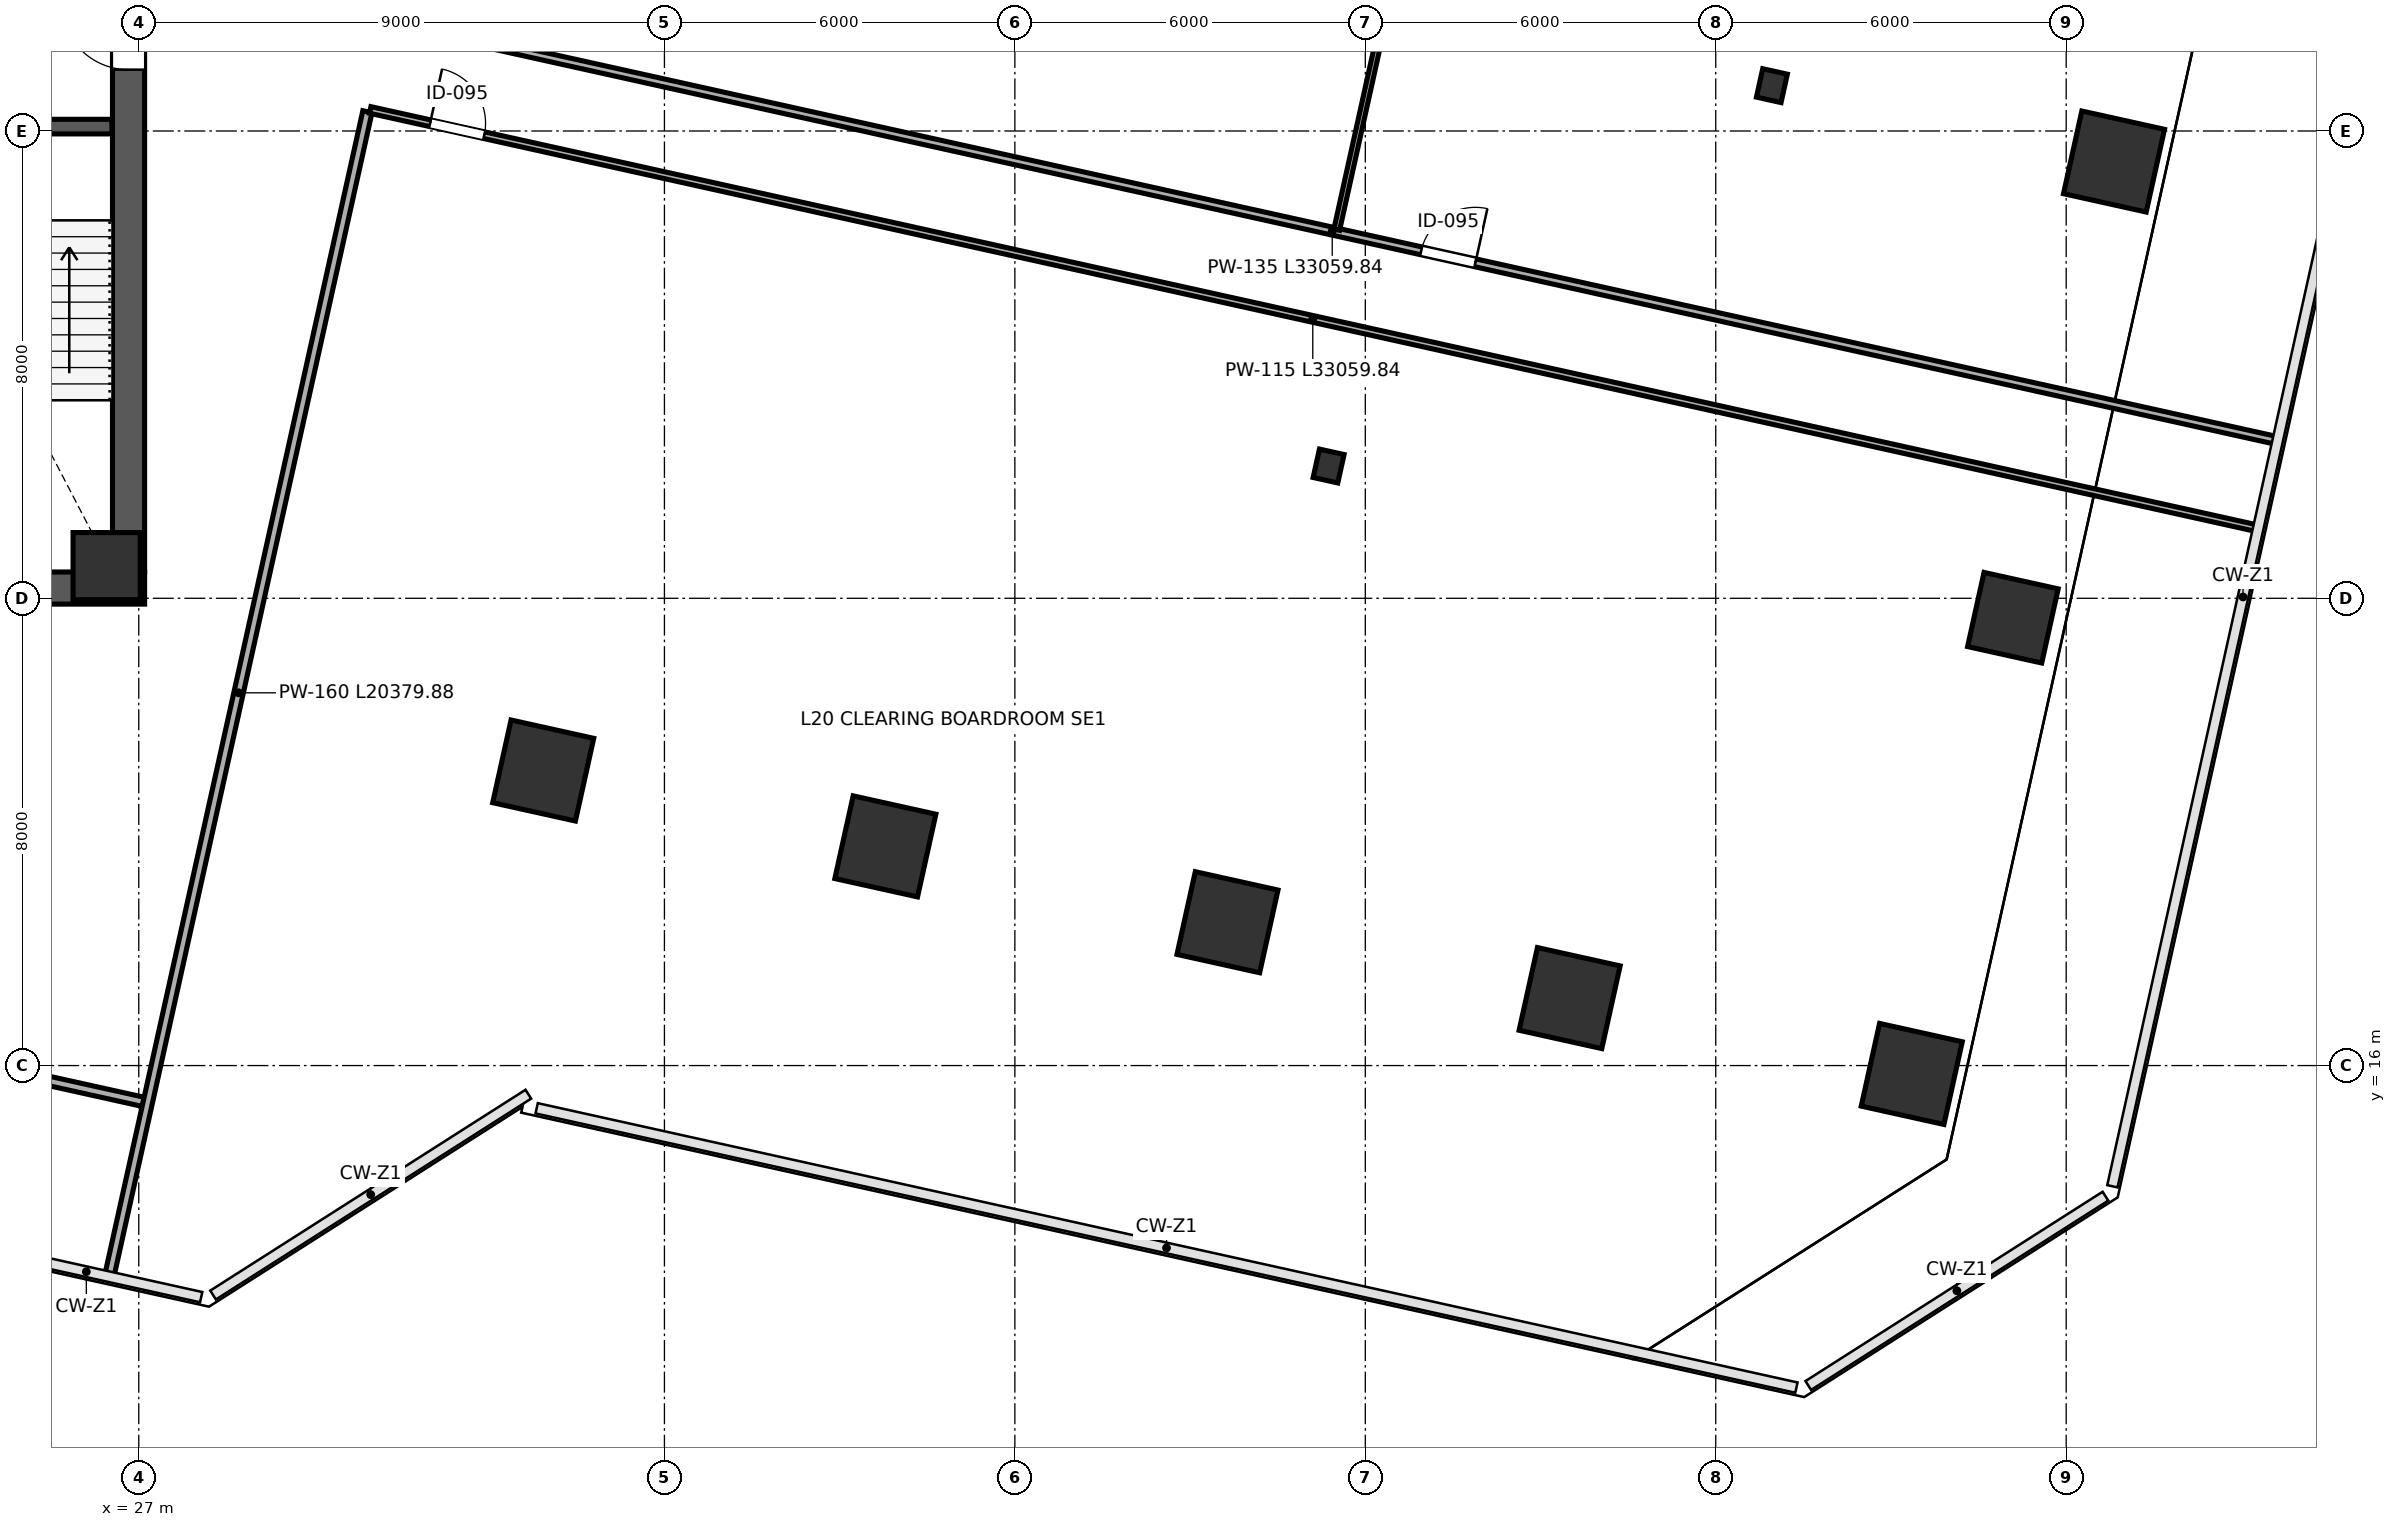
"""IFC4 building model, lengths in metres.
Left out: names, types, materials, properties, quantities, classifications, styles, units other than length and angle.
Written with IfcOpenShell. Run it as: python <this file> out.ifc"""

import sys

from ifc_helpers import new_model, si_unit, direction, frame, frame_2d, origin, origin_2d, place, context, subcontext, project, spatial, rectangle, i_section, extrude, clip, halfspace, source, transform, mapped, element, fill, save


model = new_model("IFC4")
c1 = context("Model", 3, precision=1e-05, world=origin(), true_north=direction((0.0, 1.0)))
c2 = subcontext(c1, "Body", "Model", "MODEL_VIEW")
j1 = project(units=[si_unit("LENGTHUNIT", "METRE"), si_unit("PLANEANGLEUNIT", "RADIAN")], contexts=[c1])
p1 = place(None, origin())
s1 = spatial("IfcSite", under=j1, at=p1, CompositionType="ELEMENT")
p2 = place(p1, origin())
s2 = spatial("IfcBuilding", under=s1, at=p2, CompositionType="ELEMENT")
p3 = place(p2, frame((0.0, 0.0, 91.6)))
s3 = spatial("IfcBuildingStorey", under=s2, at=p3, CompositionType="ELEMENT", Elevation=91.6)
m1 = source(origin(), c2, "Body", "SweptSolid", [
    extrude(rectangle(XDim=1.15, YDim=1.15, at=origin_2d()), origin(), (0.0, 0.0, 1.0), 4.198),
])
p4 = place(p3, frame((26.45, 24.55, 0.001), z_axis=(0.0, 0.0, 1.0), x_axis=(1.0, 0.0, 0.0)))
e1 = element("IfcColumn", 1, at=p4, inside=s3, PredefinedType="COLUMN", context=c2, shape_type="MappedRepresentation", body=[
    mapped(m1, transform((0.0, 0.0, 0.0), scale=1.0)),
])
p5 = place(p3, frame((33.925, 21.051, 0.0), z_axis=(-0.057336337044, -0.06370704116, 0.996320208247), x_axis=(-0.581417437617, 0.813393895809, 0.018550835444)))
e2 = element("IfcColumn", 2, at=p5, inside=s3, PredefinedType="COLUMN", context=c2, shape_type="Clipping", body=[
    clip(clip(extrude(rectangle(XDim=1.45, YDim=1.45, at=origin_2d()), origin(), (0.0, 0.0, 1.0), 4.216), halfspace(frame((0.0, 0.0, 0.075), z_axis=(0.0, 0.0, -1.0), x_axis=(1.0, 0.0, 0.0)), False)), halfspace(frame((0.0, 0.0, 4.14), z_axis=(0.0, 0.0, 1.0), x_axis=(1.0, 0.0, 0.0)), False)),
])
p6 = place(p3, frame((39.783, 19.753, 0.0), z_axis=(-0.064279136537, -0.093675435276, 0.993525593748), x_axis=(-0.68333326756, 0.729692406215, 0.02458938302)))
e3 = element("IfcColumn", 3, at=p6, inside=s3, PredefinedType="COLUMN", context=c2, shape_type="Clipping", body=[
    clip(clip(extrude(rectangle(XDim=1.45, YDim=1.45, at=origin_2d()), origin(), (0.0, 0.0, 1.0), 4.227), halfspace(frame((0.0, 0.0, 0.1), z_axis=(0.0, 0.0, -1.0), x_axis=(1.0, 0.0, 0.0)), False)), halfspace(frame((0.0, 0.0, 4.128), z_axis=(0.0, 0.0, 1.0), x_axis=(1.0, 0.0, 0.0)), False)),
])
p7 = place(p3, frame((45.64, 18.454, 0.0), z_axis=(-0.071001350426, -0.123360531049, 0.989818664007), x_axis=(-0.739283898003, 0.672688830219, 0.030806750093)))
e4 = element("IfcColumn", 4, at=p7, inside=s3, PredefinedType="COLUMN", context=c2, shape_type="Clipping", body=[
    clip(clip(extrude(rectangle(XDim=1.45, YDim=1.45, at=origin_2d()), origin(), (0.0, 0.0, 1.0), 4.243), halfspace(frame((0.0, 0.0, 0.125), z_axis=(0.0, 0.0, -1.0), x_axis=(1.0, 0.0, 0.0)), False)), halfspace(frame((0.0, 0.0, 4.118), z_axis=(0.0, 0.0, 1.0), x_axis=(1.0, 0.0, 0.0)), False)),
])
p8 = place(p3, frame((47.372, 26.264, 0.0), z_axis=(-0.030981497177, -0.132794298308, 0.990659286117), x_axis=(-0.902046991682, 0.430627634873, 0.029513808318)))
e5 = element("IfcColumn", 5, at=p8, inside=s3, PredefinedType="COLUMN", context=c2, shape_type="Clipping", body=[
    clip(clip(extrude(i_section(OverallWidth=0.432, OverallDepth=0.498, WebThickness=0.056, FlangeThickness=0.089, FilletRadius=0.015, at=origin_2d()), origin(), (0.0, 0.0, 1.0), 4.24), halfspace(frame((0.0, 0.0, 0.041), z_axis=(0.0, 0.0, -1.0), x_axis=(1.0, 0.0, 0.0)), False)), halfspace(frame((0.0, 0.0, 4.199), z_axis=(0.0, 0.0, 1.0), x_axis=(1.0, 0.0, 0.0)), False)),
])
p9 = place(p3, frame((49.104, 34.075, 0.0), z_axis=(0.009090987386, -0.142003524493, 0.989824405124), x_axis=(-0.987988794605, 0.15142528952, 0.030798107544)))
e6 = element("IfcColumn", 6, at=p9, inside=s3, PredefinedType="COLUMN", context=c2, shape_type="Clipping", body=[
    clip(clip(extrude(i_section(OverallWidth=0.432, OverallDepth=0.498, WebThickness=0.056, FlangeThickness=0.089, FilletRadius=0.015, at=origin_2d()), origin(), (0.0, 0.0, 1.0), 4.243), halfspace(frame((0.0, 0.0, 0.042), z_axis=(0.0, 0.0, -1.0), x_axis=(1.0, 0.0, 0.0)), False)), halfspace(frame((0.0, 0.0, 4.201), z_axis=(0.0, 0.0, 1.0), x_axis=(1.0, 0.0, 0.0)), False)),
])
p10 = place(p3, frame((51.498, 17.155, 0.0), z_axis=(-0.077658402909, -0.15268237622, 0.985219399144), x_axis=(-0.773528500234, 0.632676114937, 0.037075502884)))
e7 = element("IfcColumn", 7, at=p10, inside=s3, PredefinedType="COLUMN", context=c2, shape_type="Clipping", body=[
    clip(clip(extrude(rectangle(XDim=1.45, YDim=1.45, at=origin_2d()), origin(), (0.0, 0.0, 1.0), 4.263), halfspace(frame((0.0, 0.0, 0.151), z_axis=(0.0, 0.0, -1.0), x_axis=(1.0, 0.0, 0.0)), False)), halfspace(frame((0.0, 0.0, 4.112), z_axis=(0.0, 0.0, 1.0), x_axis=(1.0, 0.0, 0.0)), False)),
])
p11 = place(p3, frame((54.961, 32.776, 0.0), z_axis=(0.002118993695, -0.17129486873, 0.98521752817), x_axis=(-0.978858988492, 0.201147495706, 0.037077831903)))
e8 = element("IfcColumn", 8, at=p11, inside=s3, PredefinedType="COLUMN", context=c2, shape_type="Clipping", body=[
    clip(clip(extrude(i_section(OverallWidth=0.432, OverallDepth=0.498, WebThickness=0.056, FlangeThickness=0.089, FilletRadius=0.015, at=origin_2d()), origin(), (0.0, 0.0, 1.0), 4.263), halfspace(frame((0.0, 0.0, 0.051), z_axis=(0.0, 0.0, -1.0), x_axis=(1.0, 0.0, 0.0)), False)), halfspace(frame((0.0, 0.0, 4.212), z_axis=(0.0, 0.0, 1.0), x_axis=(1.0, 0.0, 0.0)), False)),
])
p12 = place(p3, frame((57.356, 15.857, 0.0), z_axis=(-0.084177104855, -0.181567395317, 0.979769103399), x_axis=(-0.796541675697, 0.603029895618, 0.043316323348)))
e9 = element("IfcColumn", 9, at=p12, inside=s3, PredefinedType="COLUMN", context=c2, shape_type="Clipping", body=[
    clip(clip(extrude(rectangle(XDim=1.45, YDim=1.45, at=origin_2d()), origin(), (0.0, 0.0, 1.0), 4.287), halfspace(frame((0.0, 0.0, 0.177), z_axis=(0.0, 0.0, -1.0), x_axis=(1.0, 0.0, 0.0)), False)), halfspace(frame((0.0, 0.0, 4.109), z_axis=(0.0, 0.0, 1.0), x_axis=(1.0, 0.0, 0.0)), False)),
])
p13 = place(p3, frame((59.087, 23.667, 0.0), z_axis=(-0.044517820208, -0.190953518176, 0.980589066623), x_axis=(-0.902611316774, 0.428359438331, 0.042438218916)))
e10 = element("IfcColumn", 10, at=p13, inside=s3, PredefinedType="COLUMN", context=c2, shape_type="Clipping", body=[
    clip(clip(extrude(rectangle(XDim=1.3, YDim=1.3, at=origin_2d()), origin(), (0.0, 0.0, 1.0), 4.283), halfspace(frame((0.0, 0.0, 0.156), z_axis=(0.0, 0.0, -1.0), x_axis=(1.0, 0.0, 0.0)), False)), halfspace(frame((0.0, 0.0, 4.127), z_axis=(0.0, 0.0, 1.0), x_axis=(1.0, 0.0, 0.0)), False)),
])
p14 = place(p3, frame((60.819, 31.477, 0.0), z_axis=(-0.004841088543, -0.200022387801, 0.979779367123), x_axis=(-0.970879185763, 0.235623099387, 0.043305446391)))
e11 = element("IfcColumn", 11, at=p14, inside=s3, PredefinedType="COLUMN", context=c2, shape_type="Clipping", body=[
    clip(clip(extrude(rectangle(XDim=1.45, YDim=1.45, at=origin_2d()), origin(), (0.0, 0.0, 1.0), 4.287), halfspace(frame((0.0, 0.0, 0.177), z_axis=(0.0, 0.0, -1.0), x_axis=(1.0, 0.0, 0.0)), False)), halfspace(frame((0.0, 0.0, 4.109), z_axis=(0.0, 0.0, 1.0), x_axis=(1.0, 0.0, 0.0)), False)),
])
p15 = place(p3, frame((26.825, 24.45, 0.0), z_axis=(0.0, 0.0, 1.0), x_axis=(0.0, 1.0, 0.0)))
e12 = element("IfcWall", 12, at=p15, inside=s3, PredefinedType="SHEAR", context=c2, shape_type="SweptSolid", body=[
    extrude(rectangle(XDim=15.1, YDim=0.55, at=frame_2d((7.55, 0.0))), origin(), (0.0, 0.0, 1.0), 3.96),
])
p16 = place(p15, frame((8.6, 0.0, 0.0)))
e13 = element("IfcOpeningElement", 13, at=p16, cuts=e12, PredefinedType="OPENING", context=c2, shape_type="SweptSolid", body=[
    extrude(rectangle(XDim=1.15, YDim=2.2, at=frame_2d((0.575, 1.1))), frame((0.0, 0.285, 0.0), z_axis=(0.0, -1.0, 0.0), x_axis=(1.0, 0.0, 0.0)), (0.0, 0.0, 1.0), 0.57),
])
p17 = place(p3, frame((8.9, 24.175, 0.0), z_axis=(0.0, 0.0, 1.0), x_axis=(1.0, 0.0, 0.0)))
e14 = element("IfcWall", 14, at=p17, inside=s3, PredefinedType="SHEAR", context=c2, shape_type="SweptSolid", body=[
    extrude(rectangle(XDim=18.2, YDim=0.55, at=frame_2d((9.1, 0.0))), origin(), (0.0, 0.0, 1.0), 3.96),
])
p18 = place(p3, frame((23.19, 32.075, 0.0), z_axis=(0.0, 0.0, 1.0), x_axis=(1.0, 0.0, 0.0)))
e15 = element("IfcWall", 15, at=p18, inside=s3, PredefinedType="SHEAR", context=c2, shape_type="SweptSolid", body=[
    extrude(rectangle(XDim=3.35, YDim=0.25, at=frame_2d((1.675, 0.0))), origin(), (0.0, 0.0, 1.0), 3.96),
])
p19 = place(p18, frame((0.85, 0.0, 0.0)))
e16 = element("IfcOpeningElement", 16, at=p19, cuts=e15, PredefinedType="OPENING", context=c2, shape_type="SweptSolid", body=[
    extrude(rectangle(XDim=1.15, YDim=2.2, at=frame_2d((0.575, 1.1))), frame((0.0, 0.135, 0.0), z_axis=(0.0, -1.0, 0.0), x_axis=(1.0, 0.0, 0.0)), (0.0, 0.0, 1.0), 0.27),
])
p20 = place(p3, frame((9.16, 19.351, 0.0), z_axis=(0.0, 0.0, 1.0), x_axis=(0.97629657883, -0.216437035106, 0.0)))
e17 = element("IfcWall", 17, at=p20, inside=s3, PredefinedType="PARTITIONING", context=c2, shape_type="SweptSolid", body=[
    extrude(rectangle(XDim=18.39, YDim=0.16, at=frame_2d((9.195, 0.0))), origin(), (0.0, 0.0, 1.0), 3.96),
])
p21 = place(p20, frame((1.45, 0.0, 0.0)))
e18 = element("IfcOpeningElement", 18, at=p21, cuts=e17, PredefinedType="OPENING", context=c2, shape_type="SweptSolid", body=[
    extrude(rectangle(XDim=0.95, YDim=2.15, at=frame_2d((0.475, 1.075))), frame((0.0, 0.09, 0.0), z_axis=(0.0, -1.0, 0.0), x_axis=(1.0, 0.0, 0.0)), (0.0, 0.0, 1.0), 0.18),
])
p22 = place(p3, frame((26.504, 12.433, 0.0), z_axis=(0.0, 0.0, 1.0), x_axis=(0.216434476574, 0.976297146032, 0.0)))
e19 = element("IfcWall", 19, at=p22, inside=s3, PredefinedType="PARTITIONING", context=c2, shape_type="SweptSolid", body=[
    extrude(rectangle(XDim=20.38, YDim=0.16, at=frame_2d((10.19, 0.0))), origin(), (0.0, 0.0, 1.0), 3.96),
])
p23 = place(p3, frame((31.296, 33.864, 0.0), z_axis=(0.0, 0.0, 1.0), x_axis=(0.976295884124, -0.216440168738, 0.0)))
e20 = element("IfcWall", 20, at=p23, inside=s3, PredefinedType="PARTITIONING", context=c2, shape_type="SweptSolid", body=[
    extrude(rectangle(XDim=33.06, YDim=0.135, at=frame_2d((16.53, 0.0))), origin(), (0.0, 0.0, 1.0), 3.095),
])
p24 = place(p23, frame((1.05, 0.0, 0.0)))
e21 = element("IfcOpeningElement", 21, at=p24, cuts=e20, PredefinedType="OPENING", context=c2, shape_type="SweptSolid", body=[
    extrude(rectangle(XDim=0.95, YDim=2.15, at=frame_2d((0.475, 1.075))), frame((0.0, 0.078, 0.0), z_axis=(0.0, -1.0, 0.0), x_axis=(1.0, 0.0, 0.0)), (0.0, 0.0, 1.0), 0.155),
])
p25 = place(p23, frame((18.09, 0.0, 0.0)))
e22 = element("IfcOpeningElement", 22, at=p25, cuts=e20, PredefinedType="OPENING", context=c2, shape_type="SweptSolid", body=[
    extrude(rectangle(XDim=0.95, YDim=2.15, at=frame_2d((0.475, 1.075))), frame((0.0, 0.078, 0.0), z_axis=(0.0, -1.0, 0.0), x_axis=(1.0, 0.0, 0.0)), (0.0, 0.0, 1.0), 0.155),
])
p26 = place(p3, frame((30.962, 32.361, 0.0), z_axis=(0.0, 0.0, 1.0), x_axis=(0.976295538171, -0.216441729221, 0.0)))
e23 = element("IfcWall", 23, at=p26, inside=s3, PredefinedType="PARTITIONING", context=c2, shape_type="SweptSolid", body=[
    extrude(rectangle(XDim=33.06, YDim=0.115, at=frame_2d((16.53, 0.0))), origin(), (0.0, 0.0, 1.0), 3.095),
])
p27 = place(p26, frame((1.05, 0.0, 0.0)))
e24 = element("IfcOpeningElement", 24, at=p27, cuts=e23, PredefinedType="OPENING", context=c2, shape_type="SweptSolid", body=[
    extrude(rectangle(XDim=0.95, YDim=2.15, at=frame_2d((0.475, 1.075))), frame((0.0, 0.067, 0.0), z_axis=(0.0, -1.0, 0.0), x_axis=(1.0, 0.0, 0.0)), (0.0, 0.0, 1.0), 0.135),
])
p28 = place(p3, frame((47.511, 30.31, 0.0), z_axis=(0.0, 0.0, 1.0), x_axis=(0.216425867349, 0.976299054564, 0.0)))
e25 = element("IfcWall", 25, at=p28, inside=s3, PredefinedType="PARTITIONING", context=c2, shape_type="SweptSolid", body=[
    extrude(rectangle(XDim=12.04, YDim=0.1, at=frame_2d((6.02, 0.0))), origin(), (0.0, 0.0, 1.0), 3.323),
])
m2 = source(origin(), c2, "Body", "SweptSolid", [
    extrude(rectangle(XDim=1.15, YDim=2.2, at=frame_2d((0.575, 1.1))), frame((0.0, 0.025, 0.0), z_axis=(0.0, -1.0, 0.0), x_axis=(1.0, 0.0, 0.0)), (0.0, 0.0, 1.0), 0.05),
])
p29 = place(p16, origin())
e26 = element("IfcDoor", 26, at=p29, inside=s3, OperationType="SINGLE_SWING_RIGHT", PredefinedType="DOOR", context=c2, shape_type="MappedRepresentation", body=[
    mapped(m2, transform((0.0, 0.0, 0.0), scale=1.0)),
])
fill(e13, e26)
m3 = source(origin(), c2, "Body", "SweptSolid", [
    extrude(rectangle(XDim=0.95, YDim=2.15, at=frame_2d((0.475, 1.075))), frame((0.0, 0.025, 0.0), z_axis=(0.0, -1.0, 0.0), x_axis=(1.0, 0.0, 0.0)), (0.0, 0.0, 1.0), 0.05),
])
p30 = place(p25, origin())
e27 = element("IfcDoor", 27, at=p30, inside=s3, OperationType="SINGLE_SWING_RIGHT", PredefinedType="DOOR", context=c2, shape_type="MappedRepresentation", body=[
    mapped(m3, transform((0.0, 0.0, 0.0), scale=1.0)),
])
fill(e22, e27)
p31 = place(p27, origin())
e28 = element("IfcDoor", 28, at=p31, inside=s3, OperationType="SINGLE_SWING_LEFT", PredefinedType="DOOR", context=c2, shape_type="MappedRepresentation", body=[
    mapped(m3, transform((0.0, 0.0, 0.0), scale=1.0)),
])
fill(e24, e28)
save(model, sys.argv[1])
